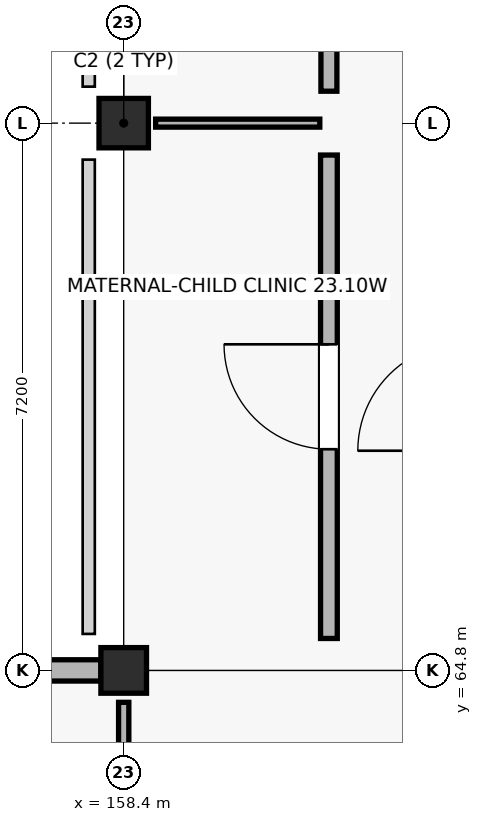
"""IFC4 building model, lengths in metres.
Left out: names, types, materials, properties, quantities, classifications, styles, units other than length and angle.
Written with IfcOpenShell. Run it as: python <this file> out.ifc"""

import sys

from ifc_helpers import new_model, si_unit, direction, frame, frame_2d, origin, origin_2d, place, context, subcontext, project, spatial, rectangle, extrude, element, fill, save


model = new_model("IFC4")
c1 = context("Model", 3, precision=1e-05, world=origin(), true_north=direction((0.0, 1.0)))
c2 = subcontext(c1, "Body", "Model", "MODEL_VIEW")
j1 = project(units=[si_unit("LENGTHUNIT", "METRE"), si_unit("PLANEANGLEUNIT", "RADIAN")], contexts=[c1])
p1 = place(None, origin())
s1 = spatial("IfcSite", under=j1, at=p1, CompositionType="ELEMENT")
p2 = place(p1, origin())
s2 = spatial("IfcBuilding", under=s1, at=p2, CompositionType="ELEMENT")
p3 = place(p2, frame((0.0, 0.0, 4.5)))
s3 = spatial("IfcBuildingStorey", under=s2, at=p3, CompositionType="ELEMENT", Elevation=4.5)
p4 = place(p3, frame((158.4, 64.8, 0.0), z_axis=(0.0, 0.0, 1.0), x_axis=(1.0, 0.0, 0.0)))
e1 = element("IfcColumn", 1, at=p4, inside=s3, PredefinedType="COLUMN", context=c2, shape_type="SweptSolid", body=[
    extrude(rectangle(XDim=0.6, YDim=0.6, at=origin_2d()), origin(), (0.0, 0.0, 1.0), 4.5),
])
p5 = place(p3, frame((158.4, 72.0, 0.0), z_axis=(0.0, 0.0, 1.0), x_axis=(1.0, 0.0, 0.0)))
e2 = element("IfcColumn", 2, at=p5, inside=s3, PredefinedType="COLUMN", context=c2, shape_type="SweptSolid", body=[
    extrude(rectangle(XDim=0.65, YDim=0.65, at=origin_2d()), origin(), (0.0, 0.0, 1.0), 4.5),
])
p6 = place(p3, frame((158.1, 64.8, 0.0), z_axis=(0.0, 0.0, 1.0), x_axis=(-1.0, 0.0, 0.0)))
e3 = element("IfcWall", 3, at=p6, inside=s3, PredefinedType="STANDARD", context=c2, shape_type="SweptSolid", body=[
    extrude(rectangle(XDim=6.6, YDim=0.28, at=frame_2d((3.3, 0.0))), origin(), (0.0, 0.0, 1.0), 3.47),
])
p7 = place(p6, frame((1.15, 0.0, 0.9)))
e4 = element("IfcOpeningElement", 4, at=p7, cuts=e3, PredefinedType="OPENING", context=c2, shape_type="SweptSolid", body=[
    extrude(rectangle(XDim=1.2, YDim=1.25, at=frame_2d((0.6, 0.625))), frame((0.0, 0.15, 0.0), z_axis=(0.0, -1.0, 0.0), x_axis=(1.0, 0.0, 0.0)), (0.0, 0.0, 1.0), 0.3),
])
p8 = place(p6, frame((4.25, 0.0, 0.9)))
e5 = element("IfcOpeningElement", 5, at=p8, cuts=e3, PredefinedType="OPENING", context=c2, shape_type="SweptSolid", body=[
    extrude(rectangle(XDim=1.2, YDim=1.25, at=frame_2d((0.6, 0.625))), frame((0.0, 0.15, 0.0), z_axis=(0.0, -1.0, 0.0), x_axis=(1.0, 0.0, 0.0)), (0.0, 0.0, 1.0), 0.3),
])
p9 = place(p3, frame((158.4, 62.34, 0.0), z_axis=(0.0, 0.0, 1.0), x_axis=(0.0, 1.0, 0.0)))
e6 = element("IfcWall", 6, at=p9, inside=s3, PredefinedType="PARTITIONING", context=c2, shape_type="SweptSolid", body=[
    extrude(rectangle(XDim=2.04, YDim=0.135, at=frame_2d((1.02, 0.0))), origin(), (0.0, 0.0, 1.0), 3.36),
])
p10 = place(p3, frame((161.1, 65.22, 0.0), z_axis=(0.0, 0.0, 1.0), x_axis=(0.0, 1.0, 0.0)))
e7 = element("IfcWall", 7, at=p10, inside=s3, PredefinedType="SOLIDWALL", context=c2, shape_type="SweptSolid", body=[
    extrude(rectangle(XDim=6.36, YDim=0.22, at=frame_2d((3.18, 0.0))), origin(), (0.0, 0.0, 1.0), 3.36),
])
p11 = place(p10, frame((2.49, 0.0, 0.0)))
e8 = element("IfcOpeningElement", 8, at=p11, cuts=e7, PredefinedType="OPENING", context=c2, shape_type="SweptSolid", body=[
    extrude(rectangle(XDim=1.38, YDim=2.19, at=frame_2d((0.69, 1.095))), frame((0.0, 0.12, 0.0), z_axis=(0.0, -1.0, 0.0), x_axis=(1.0, 0.0, 0.0)), (0.0, 0.0, 1.0), 0.24),
])
p12 = place(p3, frame((158.82, 72.0, 0.0), z_axis=(0.0, 0.0, 1.0), x_axis=(1.0, 0.0, 0.0)))
e9 = element("IfcWall", 9, at=p12, inside=s3, PredefinedType="PARTITIONING", context=c2, shape_type="SweptSolid", body=[
    extrude(rectangle(XDim=2.16, YDim=0.105, at=frame_2d((1.08, 0.0))), origin(), (0.0, 0.0, 1.0), 3.36),
])
p13 = place(p3, frame((161.1, 72.42, 0.0), z_axis=(0.0, 0.0, 1.0), x_axis=(0.0, 1.0, 0.0)))
e10 = element("IfcWall", 10, at=p13, inside=s3, PredefinedType="PLUMBINGWALL", context=c2, shape_type="SweptSolid", body=[
    extrude(rectangle(XDim=6.36, YDim=0.21, at=frame_2d((3.18, 0.0))), origin(), (0.0, 0.0, 1.0), 3.36),
])
p14 = place(p13, frame((2.45, 0.0, 0.0)))
e11 = element("IfcOpeningElement", 11, at=p14, cuts=e10, PredefinedType="OPENING", context=c2, shape_type="SweptSolid", body=[
    extrude(rectangle(XDim=1.46, YDim=2.19, at=frame_2d((0.73, 1.095))), frame((0.0, 0.115, 0.0), z_axis=(0.0, -1.0, 0.0), x_axis=(1.0, 0.0, 0.0)), (0.0, 0.0, 1.0), 0.23),
])
p15 = place(p11, origin())
e12 = element("IfcDoor", 12, at=p15, inside=s3, OperationType="SINGLE_SWING_RIGHT", PredefinedType="DOOR", context=c2, shape_type="SweptSolid", body=[
    extrude(rectangle(XDim=1.38, YDim=2.19, at=frame_2d((0.69, 1.095))), frame((0.0, 0.025, 0.0), z_axis=(0.0, -1.0, 0.0), x_axis=(1.0, 0.0, 0.0)), (0.0, 0.0, 1.0), 0.05),
])
fill(e8, e12)
save(model, sys.argv[1])
